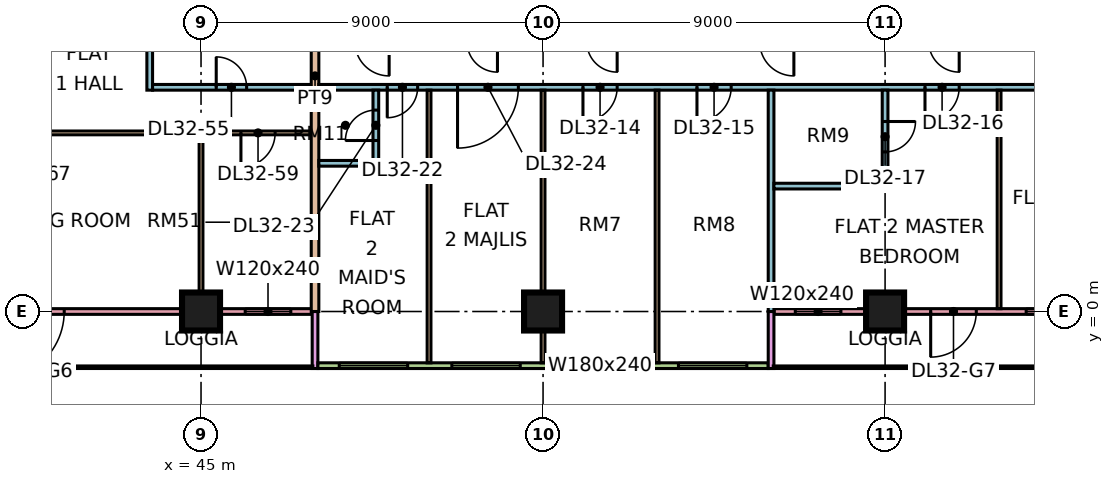
"""IFC4 building model, lengths in metres.
Left out: names, types, materials, properties, quantities, classifications, styles, units other than length and angle.
Written with IfcOpenShell. Run it as: python <this file> out.ifc"""

import sys

from ifc_helpers import new_model, si_unit, direction, frame, frame_2d, origin, origin_2d, place, context, subcontext, project, spatial, rectangle, extrude, element, fill, save


model = new_model("IFC4")
c1 = context("Model", 3, precision=1e-05, world=origin(), true_north=direction((0.0, 1.0)))
c2 = subcontext(c1, "Body", "Model", "MODEL_VIEW")
j1 = project(units=[si_unit("LENGTHUNIT", "METRE"), si_unit("PLANEANGLEUNIT", "RADIAN")], contexts=[c1])
p1 = place(None, origin())
s1 = spatial("IfcSite", under=j1, at=p1, CompositionType="ELEMENT")
p2 = place(p1, origin())
s2 = spatial("IfcBuilding", under=s1, at=p2, CompositionType="ELEMENT")
p3 = place(p2, frame((0.0, 0.0, 136.9)))
s3 = spatial("IfcBuildingStorey", under=s2, at=p3, CompositionType="ELEMENT", Elevation=136.9)
for number, where, z_axis, x_axis in (
    (1, (45.0, 0.0, 0.0), (0.0, 0.0, 1.0), (1.0, 0.0, 0.0)),
    (2, (54.0, 0.0, 0.0), (0.0, 0.0, 1.0), (1.0, 0.0, 0.0)),
    (3, (63.0, 0.0, 0.0), (0.0, 0.0, 1.0), (1.0, 0.0, 0.0)),
):
    element("IfcColumn", number, at=place(p3, frame(where, z_axis=z_axis, x_axis=x_axis)), inside=s3, PredefinedType="COLUMN", context=c2, shape_type="SweptSolid", body=[
        extrude(rectangle(XDim=1.0, YDim=1.0, at=origin_2d()), origin(), (0.0, 0.0, 1.0), 3.75),
    ])
p4 = place(p3, frame((36.075, 0.0, 0.0), z_axis=(0.0, 0.0, 1.0), x_axis=(1.0, 0.0, 0.0)))
e4 = element("IfcWall", 4, at=p4, inside=s3, PredefinedType="SOLIDWALL", context=c2, shape_type="SweptSolid", body=[
    extrude(rectangle(XDim=11.85, YDim=0.15, at=frame_2d((5.925, 0.0))), origin(), (0.0, 0.0, 1.0), 3.3),
])
p5 = place(p4, frame((3.525, 0.0, 0.0)))
e5 = element("IfcOpeningElement", 5, at=p5, cuts=e4, PredefinedType="OPENING", context=c2, shape_type="SweptSolid", body=[
    extrude(rectangle(XDim=1.8, YDim=2.4, at=frame_2d((0.9, 1.2))), frame((0.0, 0.085, 0.0), z_axis=(0.0, -1.0, 0.0), x_axis=(1.0, 0.0, 0.0)), (0.0, 0.0, 1.0), 0.17),
])
p6 = place(p4, frame((10.087, 0.0, 0.45)))
e6 = element("IfcOpeningElement", 6, at=p6, cuts=e4, PredefinedType="OPENING", context=c2, shape_type="SweptSolid", body=[
    extrude(rectangle(XDim=1.2, YDim=2.4, at=frame_2d((0.6, 1.2))), frame((0.0, 0.085, 0.0), z_axis=(0.0, -1.0, 0.0), x_axis=(1.0, 0.0, 0.0)), (0.0, 0.0, 1.0), 0.17),
])
p7 = place(p3, frame((48.0, -1.5, 0.0), z_axis=(0.0, 0.0, 1.0), x_axis=(0.0, 1.0, 0.0)))
e7 = element("IfcWall", 7, at=p7, inside=s3, PredefinedType="SOLIDWALL", context=c2, shape_type="SweptSolid", body=[
    extrude(rectangle(XDim=1.5, YDim=0.15, at=frame_2d((0.75, 0.0))), origin(), (0.0, 0.0, 1.0), 3.3),
])
p8 = place(p3, frame((48.075, -1.425, 0.0), z_axis=(0.0, 0.0, 1.0), x_axis=(1.0, 0.0, 0.0)))
e8 = element("IfcWall", 8, at=p8, inside=s3, PredefinedType="SOLIDWALL", context=c2, shape_type="SweptSolid", body=[
    extrude(rectangle(XDim=11.85, YDim=0.15, at=frame_2d((5.925, 0.0))), origin(), (0.0, 0.0, 1.0), 3.3),
])
p9 = place(p8, frame((0.562, 0.0, 0.45)))
e9 = element("IfcOpeningElement", 9, at=p9, cuts=e8, PredefinedType="OPENING", context=c2, shape_type="SweptSolid", body=[
    extrude(rectangle(XDim=1.8, YDim=2.4, at=frame_2d((0.9, 1.2))), frame((0.0, 0.085, 0.0), z_axis=(0.0, -1.0, 0.0), x_axis=(1.0, 0.0, 0.0)), (0.0, 0.0, 1.0), 0.17),
])
p10 = place(p8, frame((3.525, 0.0, 0.45)))
e10 = element("IfcOpeningElement", 10, at=p10, cuts=e8, PredefinedType="OPENING", context=c2, shape_type="SweptSolid", body=[
    extrude(rectangle(XDim=1.8, YDim=2.4, at=frame_2d((0.9, 1.2))), frame((0.0, 0.085, 0.0), z_axis=(0.0, -1.0, 0.0), x_axis=(1.0, 0.0, 0.0)), (0.0, 0.0, 1.0), 0.17),
])
p11 = place(p8, frame((6.525, 0.0, 0.45)))
e11 = element("IfcOpeningElement", 11, at=p11, cuts=e8, PredefinedType="OPENING", context=c2, shape_type="SweptSolid", body=[
    extrude(rectangle(XDim=1.8, YDim=2.4, at=frame_2d((0.9, 1.2))), frame((0.0, 0.085, 0.0), z_axis=(0.0, -1.0, 0.0), x_axis=(1.0, 0.0, 0.0)), (0.0, 0.0, 1.0), 0.17),
])
p12 = place(p8, frame((9.488, 0.0, 0.45)))
e12 = element("IfcOpeningElement", 12, at=p12, cuts=e8, PredefinedType="OPENING", context=c2, shape_type="SweptSolid", body=[
    extrude(rectangle(XDim=1.8, YDim=2.4, at=frame_2d((0.9, 1.2))), frame((0.0, 0.085, 0.0), z_axis=(0.0, -1.0, 0.0), x_axis=(1.0, 0.0, 0.0)), (0.0, 0.0, 1.0), 0.17),
])
p13 = place(p3, frame((60.075, 0.0, 0.0), z_axis=(0.0, 0.0, 1.0), x_axis=(1.0, 0.0, 0.0)))
e13 = element("IfcWall", 13, at=p13, inside=s3, PredefinedType="SOLIDWALL", context=c2, shape_type="SweptSolid", body=[
    extrude(rectangle(XDim=10.35, YDim=0.15, at=frame_2d((5.175, 0.0))), origin(), (0.0, 0.0, 1.0), 3.3),
])
p14 = place(p13, frame((0.562, 0.0, 0.45)))
e14 = element("IfcOpeningElement", 14, at=p14, cuts=e13, PredefinedType="OPENING", context=c2, shape_type="SweptSolid", body=[
    extrude(rectangle(XDim=1.2, YDim=2.4, at=frame_2d((0.6, 1.2))), frame((0.0, 0.085, 0.0), z_axis=(0.0, -1.0, 0.0), x_axis=(1.0, 0.0, 0.0)), (0.0, 0.0, 1.0), 0.17),
])
p15 = place(p13, frame((4.125, 0.0, 0.0)))
e15 = element("IfcOpeningElement", 15, at=p15, cuts=e13, PredefinedType="OPENING", context=c2, shape_type="SweptSolid", body=[
    extrude(rectangle(XDim=1.2, YDim=2.4, at=frame_2d((0.6, 1.2))), frame((0.0, 0.085, 0.0), z_axis=(0.0, -1.0, 0.0), x_axis=(1.0, 0.0, 0.0)), (0.0, 0.0, 1.0), 0.17),
])
p16 = place(p13, frame((6.637, 0.0, 0.45)))
e16 = element("IfcOpeningElement", 16, at=p16, cuts=e13, PredefinedType="OPENING", context=c2, shape_type="SweptSolid", body=[
    extrude(rectangle(XDim=3.0, YDim=2.4, at=frame_2d((1.5, 1.2))), frame((0.0, 0.085, 0.0), z_axis=(0.0, -1.0, 0.0), x_axis=(1.0, 0.0, 0.0)), (0.0, 0.0, 1.0), 0.17),
])
p17 = place(p3, frame((60.0, -1.5, 0.0), z_axis=(0.0, 0.0, 1.0), x_axis=(0.0, 1.0, 0.0)))
e17 = element("IfcWall", 17, at=p17, inside=s3, PredefinedType="SOLIDWALL", context=c2, shape_type="SweptSolid", body=[
    extrude(rectangle(XDim=1.5, YDim=0.15, at=frame_2d((0.75, 0.0))), origin(), (0.0, 0.0, 1.0), 3.3),
])
p18 = place(p3, frame((33.05, 4.7, 0.0), z_axis=(0.0, 0.0, 1.0), x_axis=(1.0, 0.0, 0.0)))
e18 = element("IfcWall", 18, at=p18, inside=s3, PredefinedType="PARTITIONING", context=c2, shape_type="SweptSolid", body=[
    extrude(rectangle(XDim=14.85, YDim=0.1, at=frame_2d((7.425, 0.0))), origin(), (0.0, 0.0, 1.0), 3.3),
])
p19 = place(p18, frame((1.0, 0.0, 0.0)))
e19 = element("IfcOpeningElement", 19, at=p19, cuts=e18, PredefinedType="OPENING", context=c2, shape_type="SweptSolid", body=[
    extrude(rectangle(XDim=0.9, YDim=2.1, at=frame_2d((0.45, 1.05))), frame((0.0, 0.06, 0.0), z_axis=(0.0, -1.0, 0.0), x_axis=(1.0, 0.0, 0.0)), (0.0, 0.0, 1.0), 0.12),
])
p20 = place(p18, frame((13.0, 0.0, 0.0)))
e20 = element("IfcOpeningElement", 20, at=p20, cuts=e18, PredefinedType="OPENING", context=c2, shape_type="SweptSolid", body=[
    extrude(rectangle(XDim=0.9, YDim=2.1, at=frame_2d((0.45, 1.05))), frame((0.0, 0.06, 0.0), z_axis=(0.0, -1.0, 0.0), x_axis=(1.0, 0.0, 0.0)), (0.0, 0.0, 1.0), 0.12),
])
p21 = place(p18, frame((7.0, 0.0, 0.0)))
e21 = element("IfcOpeningElement", 21, at=p21, cuts=e18, PredefinedType="OPENING", context=c2, shape_type="SweptSolid", body=[
    extrude(rectangle(XDim=0.9, YDim=2.1, at=frame_2d((0.45, 1.05))), frame((0.0, 0.06, 0.0), z_axis=(0.0, -1.0, 0.0), x_axis=(1.0, 0.0, 0.0)), (0.0, 0.0, 1.0), 0.12),
])
p22 = place(p3, frame((43.65, 5.825, 0.0), z_axis=(0.0, 0.0, 1.0), x_axis=(0.0, 1.0, 0.0)))
e22 = element("IfcWall", 22, at=p22, inside=s3, PredefinedType="PARTITIONING", context=c2, shape_type="SweptSolid", body=[
    extrude(rectangle(XDim=6.575, YDim=0.15, at=frame_2d((3.288, 0.0))), origin(), (0.0, 0.0, 1.0), 3.3),
])
p23 = place(p22, frame((4.425, 0.0, 0.0)))
e23 = element("IfcOpeningElement", 23, at=p23, cuts=e22, PredefinedType="OPENING", context=c2, shape_type="SweptSolid", body=[
    extrude(rectangle(XDim=0.9, YDim=2.1, at=frame_2d((0.45, 1.05))), frame((0.0, 0.085, 0.0), z_axis=(0.0, -1.0, 0.0), x_axis=(1.0, 0.0, 0.0)), (0.0, 0.0, 1.0), 0.17),
])
p24 = place(p3, frame((43.725, 5.9, 0.0), z_axis=(0.0, 0.0, 1.0), x_axis=(1.0, 0.0, 0.0)))
e24 = element("IfcWall", 24, at=p24, inside=s3, PredefinedType="PARTITIONING", context=c2, shape_type="SweptSolid", body=[
    extrude(rectangle(XDim=4.175, YDim=0.15, at=frame_2d((2.087, 0.0))), origin(), (0.0, 0.0, 1.0), 3.3),
])
p25 = place(p24, frame((1.675, 0.0, 0.0)))
e25 = element("IfcOpeningElement", 25, at=p25, cuts=e24, PredefinedType="OPENING", context=c2, shape_type="SweptSolid", body=[
    extrude(rectangle(XDim=0.8, YDim=2.1, at=frame_2d((0.4, 1.05))), frame((0.0, 0.085, 0.0), z_axis=(0.0, -1.0, 0.0), x_axis=(1.0, 0.0, 0.0)), (0.0, 0.0, 1.0), 0.17),
])
p26 = place(p3, frame((45.0, 0.074, 0.0), z_axis=(0.0, 0.0, 1.0), x_axis=(0.0, 1.0, 0.0)))
e26 = element("IfcWall", 26, at=p26, inside=s3, PredefinedType="PARTITIONING", context=c2, shape_type="SweptSolid", body=[
    extrude(rectangle(XDim=4.576, YDim=0.1, at=frame_2d((2.288, 0.0))), origin(), (0.0, 0.0, 1.0), 3.3),
])
p27 = place(p3, frame((48.0, 0.0, 0.0), z_axis=(0.0, 0.0, 1.0), x_axis=(0.0, 1.0, 0.0)))
e27 = element("IfcWall", 27, at=p27, inside=s3, PredefinedType="PARTITIONING", context=c2, shape_type="SweptSolid", body=[
    extrude(rectangle(XDim=12.4, YDim=0.2, at=frame_2d((6.2, 0.0))), origin(), (0.0, 0.0, 1.0), 3.3),
])
p28 = place(p3, frame((48.1, 3.9, 0.0), z_axis=(0.0, 0.0, 1.0), x_axis=(1.0, 0.0, 0.0)))
e28 = element("IfcWall", 28, at=p28, inside=s3, PredefinedType="PARTITIONING", context=c2, shape_type="SweptSolid", body=[
    extrude(rectangle(XDim=1.425, YDim=0.15, at=frame_2d((0.712, 0.0))), origin(), (0.0, 0.0, 1.0), 3.3),
])
p29 = place(p3, frame((48.1, 5.9, 0.0), z_axis=(0.0, 0.0, 1.0), x_axis=(1.0, 0.0, 0.0)))
e29 = element("IfcWall", 29, at=p29, inside=s3, PredefinedType="PARTITIONING", context=c2, shape_type="SweptSolid", body=[
    extrude(rectangle(XDim=25.25, YDim=0.15, at=frame_2d((12.625, 0.0))), origin(), (0.0, 0.0, 1.0), 3.3),
])
p30 = place(p29, frame((6.95, 0.0, 0.0)))
e30 = element("IfcOpeningElement", 30, at=p30, cuts=e29, PredefinedType="OPENING", context=c2, shape_type="SweptSolid", body=[
    extrude(rectangle(XDim=0.9, YDim=2.1, at=frame_2d((0.45, 1.05))), frame((0.0, 0.085, 0.0), z_axis=(0.0, -1.0, 0.0), x_axis=(1.0, 0.0, 0.0)), (0.0, 0.0, 1.0), 0.17),
])
p31 = place(p29, frame((9.95, 0.0, 0.0)))
e31 = element("IfcOpeningElement", 31, at=p31, cuts=e29, PredefinedType="OPENING", context=c2, shape_type="SweptSolid", body=[
    extrude(rectangle(XDim=0.9, YDim=2.1, at=frame_2d((0.45, 1.05))), frame((0.0, 0.085, 0.0), z_axis=(0.0, -1.0, 0.0), x_axis=(1.0, 0.0, 0.0)), (0.0, 0.0, 1.0), 0.17),
])
p32 = place(p29, frame((15.95, 0.0, 0.0)))
e32 = element("IfcOpeningElement", 32, at=p32, cuts=e29, PredefinedType="OPENING", context=c2, shape_type="SweptSolid", body=[
    extrude(rectangle(XDim=0.9, YDim=2.1, at=frame_2d((0.45, 1.05))), frame((0.0, 0.085, 0.0), z_axis=(0.0, -1.0, 0.0), x_axis=(1.0, 0.0, 0.0)), (0.0, 0.0, 1.0), 0.17),
])
p33 = place(p29, frame((20.45, 0.0, 0.0)))
e33 = element("IfcOpeningElement", 33, at=p33, cuts=e29, PredefinedType="OPENING", context=c2, shape_type="SweptSolid", body=[
    extrude(rectangle(XDim=0.9, YDim=2.1, at=frame_2d((0.45, 1.05))), frame((0.0, 0.085, 0.0), z_axis=(0.0, -1.0, 0.0), x_axis=(1.0, 0.0, 0.0)), (0.0, 0.0, 1.0), 0.17),
])
p34 = place(p29, frame((1.8, 0.0, 0.0)))
e34 = element("IfcOpeningElement", 34, at=p34, cuts=e29, PredefinedType="OPENING", context=c2, shape_type="SweptSolid", body=[
    extrude(rectangle(XDim=0.8, YDim=2.1, at=frame_2d((0.4, 1.05))), frame((0.0, 0.085, 0.0), z_axis=(0.0, -1.0, 0.0), x_axis=(1.0, 0.0, 0.0)), (0.0, 0.0, 1.0), 0.17),
])
p35 = place(p29, frame((3.65, 0.0, 0.0)))
e35 = element("IfcOpeningElement", 35, at=p35, cuts=e29, PredefinedType="OPENING", context=c2, shape_type="SweptSolid", body=[
    extrude(rectangle(XDim=1.6, YDim=2.1, at=frame_2d((0.8, 1.05))), frame((0.0, 0.085, 0.0), z_axis=(0.0, -1.0, 0.0), x_axis=(1.0, 0.0, 0.0)), (0.0, 0.0, 1.0), 0.17),
])
p36 = place(p3, frame((49.6, 3.825, 0.0), z_axis=(0.0, 0.0, 1.0), x_axis=(0.0, 1.0, 0.0)))
e36 = element("IfcWall", 36, at=p36, inside=s3, PredefinedType="PARTITIONING", context=c2, shape_type="SweptSolid", body=[
    extrude(rectangle(XDim=2.0, YDim=0.15, at=frame_2d((1.0, 0.0))), origin(), (0.0, 0.0, 1.0), 3.3),
])
p37 = place(p36, frame((0.675, 0.0, 0.0)))
e37 = element("IfcOpeningElement", 37, at=p37, cuts=e36, PredefinedType="OPENING", context=c2, shape_type="SweptSolid", body=[
    extrude(rectangle(XDim=0.8, YDim=2.1, at=frame_2d((0.4, 1.05))), frame((0.0, 0.085, 0.0), z_axis=(0.0, -1.0, 0.0), x_axis=(1.0, 0.0, 0.0)), (0.0, 0.0, 1.0), 0.17),
])
for number, where, z_axis, x_axis in (
    (38, (51.0, -1.351, 0.0), (0.0, 0.0, 1.0), (0.0, 1.0, 0.0)),
    (39, (54.0, -1.351, 0.0), (0.0, 0.0, 1.0), (0.0, 1.0, 0.0)),
    (40, (57.0, -1.351, 0.0), (0.0, 0.0, 1.0), (0.0, 1.0, 0.0)),
):
    element("IfcWall", number, at=place(p3, frame(where, z_axis=z_axis, x_axis=x_axis)), inside=s3, PredefinedType="PARTITIONING", context=c2, shape_type="SweptSolid", body=[
        extrude(rectangle(XDim=7.176, YDim=0.1, at=frame_2d((3.588, 0.0))), origin(), (0.0, 0.0, 1.0), 3.3),
    ])
p38 = place(p3, frame((60.0, 0.0, 0.0), z_axis=(0.0, 0.0, 1.0), x_axis=(0.0, 1.0, 0.0)))
e41 = element("IfcWall", 41, at=p38, inside=s3, PredefinedType="PARTITIONING", context=c2, shape_type="SweptSolid", body=[
    extrude(rectangle(XDim=5.825, YDim=0.15, at=frame_2d((2.913, 0.0))), origin(), (0.0, 0.0, 1.0), 3.3),
])
p39 = place(p3, frame((60.075, 3.3, 0.0), z_axis=(0.0, 0.0, 1.0), x_axis=(1.0, 0.0, 0.0)))
e42 = element("IfcWall", 42, at=p39, inside=s3, PredefinedType="PARTITIONING", context=c2, shape_type="SweptSolid", body=[
    extrude(rectangle(XDim=3.0, YDim=0.15, at=frame_2d((1.5, 0.0))), origin(), (0.0, 0.0, 1.0), 3.3),
])
p40 = place(p3, frame((63.0, 3.375, 0.0), z_axis=(0.0, 0.0, 1.0), x_axis=(0.0, 1.0, 0.0)))
e43 = element("IfcWall", 43, at=p40, inside=s3, PredefinedType="PARTITIONING", context=c2, shape_type="SweptSolid", body=[
    extrude(rectangle(XDim=2.45, YDim=0.15, at=frame_2d((1.225, 0.0))), origin(), (0.0, 0.0, 1.0), 3.3),
])
p41 = place(p40, frame((0.825, 0.0, 0.0)))
e44 = element("IfcOpeningElement", 44, at=p41, cuts=e43, PredefinedType="OPENING", context=c2, shape_type="SweptSolid", body=[
    extrude(rectangle(XDim=0.8, YDim=2.1, at=frame_2d((0.4, 1.05))), frame((0.0, 0.085, 0.0), z_axis=(0.0, -1.0, 0.0), x_axis=(1.0, 0.0, 0.0)), (0.0, 0.0, 1.0), 0.17),
])
p42 = place(p3, frame((66.0, 0.074, 0.0), z_axis=(0.0, 0.0, 1.0), x_axis=(0.0, 1.0, 0.0)))
e45 = element("IfcWall", 45, at=p42, inside=s3, PredefinedType="PARTITIONING", context=c2, shape_type="SweptSolid", body=[
    extrude(rectangle(XDim=5.751, YDim=0.1, at=frame_2d((2.875, 0.0))), origin(), (0.0, 0.0, 1.0), 3.3),
])
p43 = place(p5, frame((1.8, 0.0, 0.0), z_axis=(0.0, 0.0, 1.0), x_axis=(-1.0, 0.0, 0.0)))
e46 = element("IfcDoor", 46, at=p43, inside=s3, OperationType="DOUBLE_DOOR_SINGLE_SWING", PredefinedType="DOOR", context=c2, shape_type="SweptSolid", body=[
    extrude(rectangle(XDim=1.8, YDim=2.4, at=frame_2d((0.9, 1.2))), frame((0.0, 0.025, 0.0), z_axis=(0.0, -1.0, 0.0), x_axis=(1.0, 0.0, 0.0)), (0.0, 0.0, 1.0), 0.05),
])
fill(e5, e46)
p44 = place(p6, origin())
e47 = element("IfcWindow", 47, at=p44, inside=s3, PartitioningType="SINGLE_PANEL", PredefinedType="WINDOW", context=c2, shape_type="SweptSolid", body=[
    extrude(rectangle(XDim=1.2, YDim=2.4, at=frame_2d((0.6, 1.2))), frame((0.0, 0.03, 0.0), z_axis=(0.0, -1.0, 0.0), x_axis=(1.0, 0.0, 0.0)), (0.0, 0.0, 1.0), 0.06),
])
fill(e6, e47)
p45 = place(p9, origin())
e48 = element("IfcWindow", 48, at=p45, inside=s3, PartitioningType="SINGLE_PANEL", PredefinedType="WINDOW", context=c2, shape_type="SweptSolid", body=[
    extrude(rectangle(XDim=1.8, YDim=2.4, at=frame_2d((0.9, 1.2))), frame((0.0, 0.03, 0.0), z_axis=(0.0, -1.0, 0.0), x_axis=(1.0, 0.0, 0.0)), (0.0, 0.0, 1.0), 0.06),
])
fill(e9, e48)
p46 = place(p10, origin())
e49 = element("IfcWindow", 49, at=p46, inside=s3, PartitioningType="SINGLE_PANEL", PredefinedType="WINDOW", context=c2, shape_type="SweptSolid", body=[
    extrude(rectangle(XDim=1.8, YDim=2.4, at=frame_2d((0.9, 1.2))), frame((0.0, 0.03, 0.0), z_axis=(0.0, -1.0, 0.0), x_axis=(1.0, 0.0, 0.0)), (0.0, 0.0, 1.0), 0.06),
])
fill(e10, e49)
p47 = place(p11, origin())
e50 = element("IfcWindow", 50, at=p47, inside=s3, PartitioningType="SINGLE_PANEL", PredefinedType="WINDOW", context=c2, shape_type="SweptSolid", body=[
    extrude(rectangle(XDim=1.8, YDim=2.4, at=frame_2d((0.9, 1.2))), frame((0.0, 0.03, 0.0), z_axis=(0.0, -1.0, 0.0), x_axis=(1.0, 0.0, 0.0)), (0.0, 0.0, 1.0), 0.06),
])
fill(e11, e50)
p48 = place(p12, origin())
e51 = element("IfcWindow", 51, at=p48, inside=s3, PartitioningType="SINGLE_PANEL", PredefinedType="WINDOW", context=c2, shape_type="SweptSolid", body=[
    extrude(rectangle(XDim=1.8, YDim=2.4, at=frame_2d((0.9, 1.2))), frame((0.0, 0.03, 0.0), z_axis=(0.0, -1.0, 0.0), x_axis=(1.0, 0.0, 0.0)), (0.0, 0.0, 1.0), 0.06),
])
fill(e12, e51)
p49 = place(p14, origin())
e52 = element("IfcWindow", 52, at=p49, inside=s3, PartitioningType="SINGLE_PANEL", PredefinedType="WINDOW", context=c2, shape_type="SweptSolid", body=[
    extrude(rectangle(XDim=1.2, YDim=2.4, at=frame_2d((0.6, 1.2))), frame((0.0, 0.03, 0.0), z_axis=(0.0, -1.0, 0.0), x_axis=(1.0, 0.0, 0.0)), (0.0, 0.0, 1.0), 0.06),
])
fill(e14, e52)
p50 = place(p15, frame((1.2, 0.0, 0.0), z_axis=(0.0, 0.0, 1.0), x_axis=(-1.0, 0.0, 0.0)))
e53 = element("IfcDoor", 53, at=p50, inside=s3, OperationType="DOUBLE_DOOR_SINGLE_SWING", PredefinedType="DOOR", context=c2, shape_type="SweptSolid", body=[
    extrude(rectangle(XDim=1.2, YDim=2.4, at=frame_2d((0.6, 1.2))), frame((0.0, 0.025, 0.0), z_axis=(0.0, -1.0, 0.0), x_axis=(1.0, 0.0, 0.0)), (0.0, 0.0, 1.0), 0.05),
])
fill(e15, e53)
p51 = place(p16, origin())
e54 = element("IfcWindow", 54, at=p51, inside=s3, PartitioningType="SINGLE_PANEL", PredefinedType="WINDOW", context=c2, shape_type="SweptSolid", body=[
    extrude(rectangle(XDim=3.0, YDim=2.4, at=frame_2d((1.5, 1.2))), frame((0.0, 0.03, 0.0), z_axis=(0.0, -1.0, 0.0), x_axis=(1.0, 0.0, 0.0)), (0.0, 0.0, 1.0), 0.06),
])
fill(e16, e54)
p52 = place(p30, frame((0.9, 0.0, 0.0), z_axis=(0.0, 0.0, 1.0), x_axis=(-1.0, 0.0, 0.0)))
e55 = element("IfcDoor", 55, at=p52, inside=s3, OperationType="SINGLE_SWING_LEFT", PredefinedType="DOOR", context=c2, shape_type="SweptSolid", body=[
    extrude(rectangle(XDim=0.9, YDim=2.1, at=frame_2d((0.45, 1.05))), frame((0.0, 0.025, 0.0), z_axis=(0.0, -1.0, 0.0), x_axis=(1.0, 0.0, 0.0)), (0.0, 0.0, 1.0), 0.05),
])
fill(e30, e55)
p53 = place(p31, frame((0.9, 0.0, 0.0), z_axis=(0.0, 0.0, 1.0), x_axis=(-1.0, 0.0, 0.0)))
e56 = element("IfcDoor", 56, at=p53, inside=s3, OperationType="SINGLE_SWING_LEFT", PredefinedType="DOOR", context=c2, shape_type="SweptSolid", body=[
    extrude(rectangle(XDim=0.9, YDim=2.1, at=frame_2d((0.45, 1.05))), frame((0.0, 0.025, 0.0), z_axis=(0.0, -1.0, 0.0), x_axis=(1.0, 0.0, 0.0)), (0.0, 0.0, 1.0), 0.05),
])
fill(e31, e56)
p54 = place(p32, frame((0.9, 0.0, 0.0), z_axis=(0.0, 0.0, 1.0), x_axis=(-1.0, 0.0, 0.0)))
e57 = element("IfcDoor", 57, at=p54, inside=s3, OperationType="SINGLE_SWING_LEFT", PredefinedType="DOOR", context=c2, shape_type="SweptSolid", body=[
    extrude(rectangle(XDim=0.9, YDim=2.1, at=frame_2d((0.45, 1.05))), frame((0.0, 0.025, 0.0), z_axis=(0.0, -1.0, 0.0), x_axis=(1.0, 0.0, 0.0)), (0.0, 0.0, 1.0), 0.05),
])
fill(e32, e57)
p55 = place(p41, origin())
e58 = element("IfcDoor", 58, at=p55, inside=s3, OperationType="SINGLE_SWING_RIGHT", PredefinedType="DOOR", context=c2, shape_type="SweptSolid", body=[
    extrude(rectangle(XDim=0.8, YDim=2.1, at=frame_2d((0.4, 1.05))), frame((0.0, 0.025, 0.0), z_axis=(0.0, -1.0, 0.0), x_axis=(1.0, 0.0, 0.0)), (0.0, 0.0, 1.0), 0.05),
])
fill(e44, e58)
p56 = place(p34, frame((0.8, 0.0, 0.0), z_axis=(0.0, 0.0, 1.0), x_axis=(-1.0, 0.0, 0.0)))
e59 = element("IfcDoor", 59, at=p56, inside=s3, OperationType="SINGLE_SWING_LEFT", PredefinedType="DOOR", context=c2, shape_type="SweptSolid", body=[
    extrude(rectangle(XDim=0.8, YDim=2.1, at=frame_2d((0.4, 1.05))), frame((0.0, 0.025, 0.0), z_axis=(0.0, -1.0, 0.0), x_axis=(1.0, 0.0, 0.0)), (0.0, 0.0, 1.0), 0.05),
])
fill(e34, e59)
p57 = place(p37, origin())
e60 = element("IfcDoor", 60, at=p57, inside=s3, OperationType="SINGLE_SWING_LEFT", PredefinedType="DOOR", context=c2, shape_type="SweptSolid", body=[
    extrude(rectangle(XDim=0.8, YDim=2.1, at=frame_2d((0.4, 1.05))), frame((0.0, 0.025, 0.0), z_axis=(0.0, -1.0, 0.0), x_axis=(1.0, 0.0, 0.0)), (0.0, 0.0, 1.0), 0.05),
])
fill(e37, e60)
p58 = place(p35, frame((1.6, 0.0, 0.0), z_axis=(0.0, 0.0, 1.0), x_axis=(-1.0, 0.0, 0.0)))
e61 = element("IfcDoor", 61, at=p58, inside=s3, OperationType="DOUBLE_DOOR_SINGLE_SWING", PredefinedType="DOOR", context=c2, shape_type="SweptSolid", body=[
    extrude(rectangle(XDim=1.6, YDim=2.1, at=frame_2d((0.8, 1.05))), frame((0.0, 0.025, 0.0), z_axis=(0.0, -1.0, 0.0), x_axis=(1.0, 0.0, 0.0)), (0.0, 0.0, 1.0), 0.05),
])
fill(e35, e61)
p59 = place(p25, origin())
e62 = element("IfcDoor", 62, at=p59, inside=s3, OperationType="SINGLE_SWING_LEFT", PredefinedType="DOOR", context=c2, shape_type="SweptSolid", body=[
    extrude(rectangle(XDim=0.8, YDim=2.1, at=frame_2d((0.4, 1.05))), frame((0.0, 0.025, 0.0), z_axis=(0.0, -1.0, 0.0), x_axis=(1.0, 0.0, 0.0)), (0.0, 0.0, 1.0), 0.05),
])
fill(e25, e62)
p60 = place(p20, frame((0.9, 0.0, 0.0), z_axis=(0.0, 0.0, 1.0), x_axis=(-1.0, 0.0, 0.0)))
e63 = element("IfcDoor", 63, at=p60, inside=s3, OperationType="SINGLE_SWING_LEFT", PredefinedType="DOOR", context=c2, shape_type="SweptSolid", body=[
    extrude(rectangle(XDim=0.9, YDim=2.1, at=frame_2d((0.45, 1.05))), frame((0.0, 0.025, 0.0), z_axis=(0.0, -1.0, 0.0), x_axis=(1.0, 0.0, 0.0)), (0.0, 0.0, 1.0), 0.05),
])
fill(e20, e63)
save(model, sys.argv[1])
